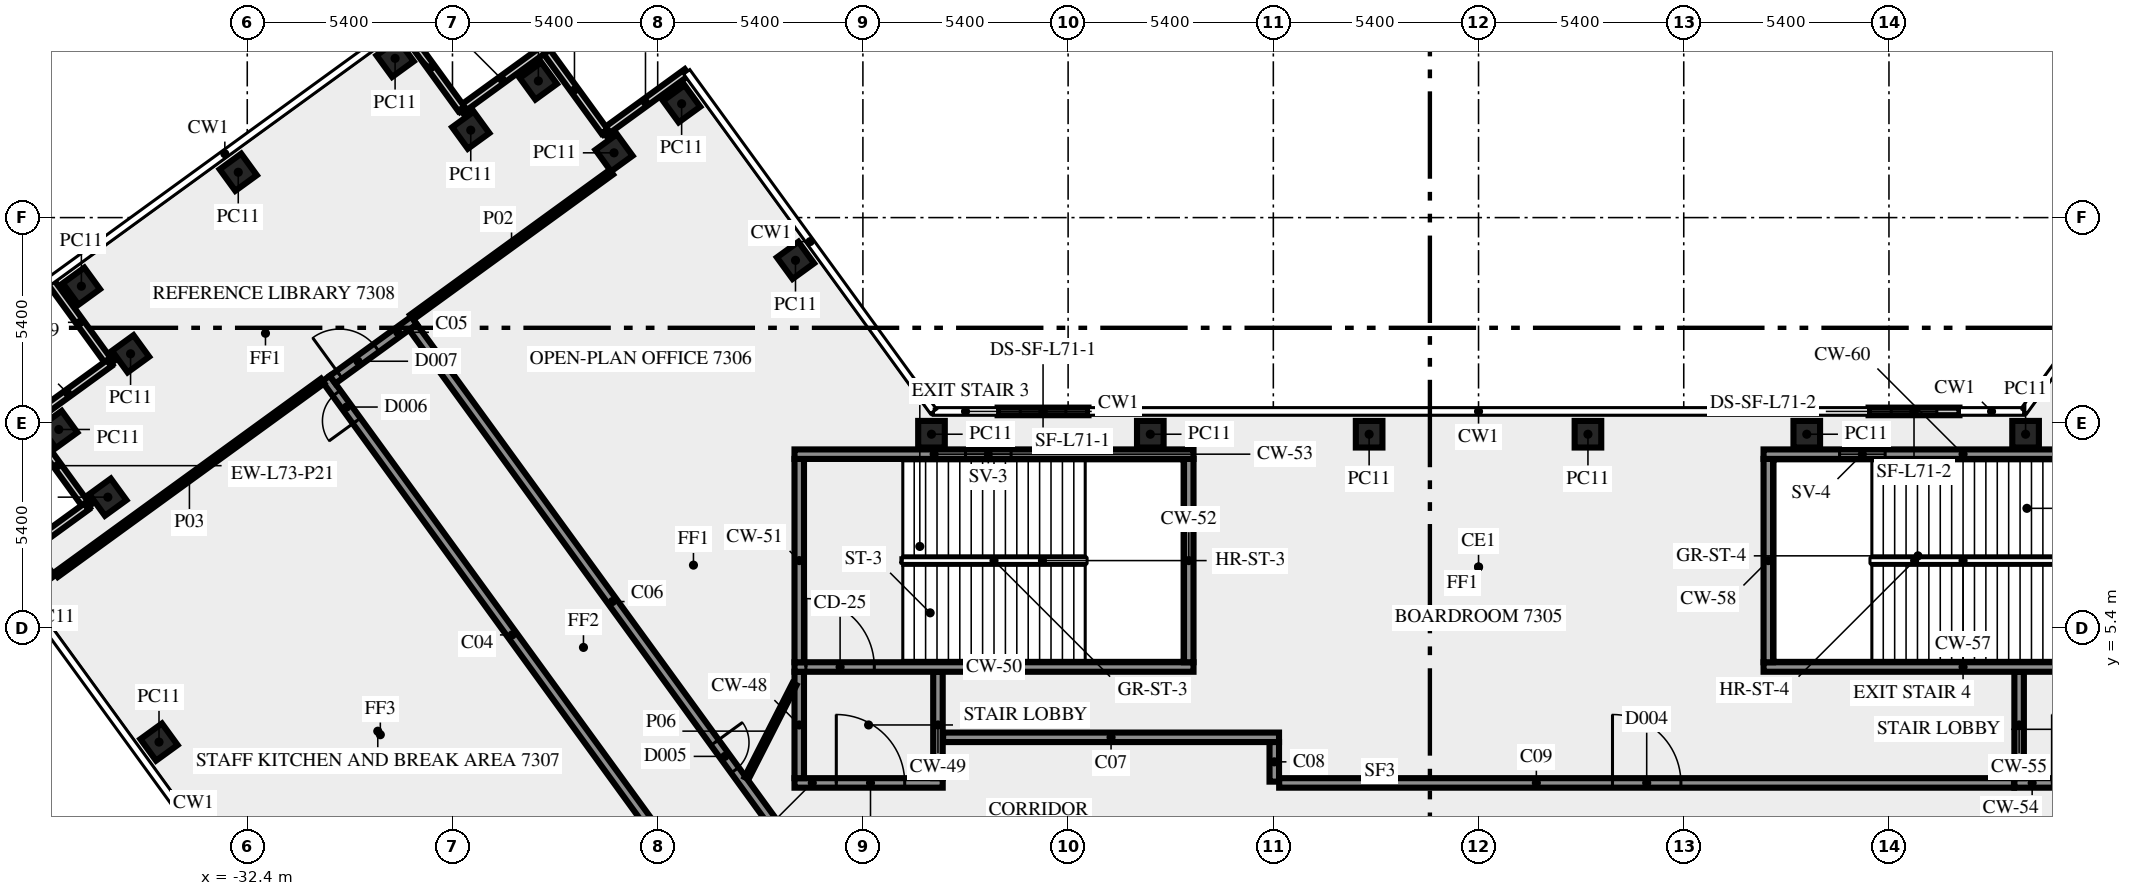
"""IFC4 building model, lengths in metres.
Left out: names, types, materials, properties, quantities, classifications, styles, units other than length and angle.
Written with IfcOpenShell. Run it as: python <this file> out.ifc"""

import sys

from ifc_helpers import new_model, si_unit, direction, frame, frame_2d, origin, origin_2d, place, context, subcontext, project, spatial, rectangle, extrude, element, fill, save


model = new_model("IFC4")
c1 = context("Model", 3, precision=1e-05, world=origin(), true_north=direction((0.0, 1.0)))
c2 = subcontext(c1, "Body", "Model", "MODEL_VIEW")
j1 = project(units=[si_unit("LENGTHUNIT", "METRE"), si_unit("PLANEANGLEUNIT", "RADIAN")], contexts=[c1])
p1 = place(None, origin())
s1 = spatial("IfcSite", under=j1, at=p1, CompositionType="ELEMENT")
p2 = place(p1, origin())
s2 = spatial("IfcBuilding", under=s1, at=p2, CompositionType="ELEMENT")
p3 = place(p2, frame((0.0, 0.0, 315.0)))
s3 = spatial("IfcBuildingStorey", under=s2, at=p3, CompositionType="ELEMENT", Elevation=315.0)
for number, where, z_axis, x_axis in (
    (1, (-17.974, 15.075, 0.0), (0.0, 0.0, 1.0), (-0.588, 0.809, 0.0)),
    (2, (-20.97, 19.195, 0.0), (0.0, 0.0, 1.0), (-0.588, 0.809, 0.0)),
    (3, (-22.749, 17.904, 0.0), (0.0, 0.0, 1.0), (-0.588, 0.809, 0.0)),
    (4, (-24.74, 19.795, 0.0), (0.0, 0.0, 1.0), (-0.588, 0.809, 0.0)),
    (5, (-26.519, 18.5, 0.0), (0.0, 0.0, 1.0), (-0.588, 0.809, 0.0)),
    (6, (-28.51, 20.39, 0.0), (0.0, 0.0, 1.0), (-0.809, -0.588, 0.0)),
    (7, (-32.637, 17.393, 0.0), (0.0, 0.0, 1.0), (-0.809, -0.588, 0.0)),
    (8, (-36.765, 14.395, 0.0), (0.0, 0.0, 1.0), (0.588, -0.809, 0.0)),
    (9, (-35.471, 12.616, 0.0), (0.0, 0.0, 1.0), (-0.809, -0.588, 0.0)),
    (10, (-37.36, 10.625, 0.0), (0.0, 0.0, 1.0), (0.588, -0.809, 0.0)),
    (11, (-36.068, 8.844, 0.0), (0.0, 0.0, 1.0), (0.588, -0.809, 0.0)),
    (12, (-37.96, 6.855, 0.0), (0.0, 0.0, 1.0), (0.588, -0.809, 0.0)),
    (13, (-34.722, 2.4, 0.0), (0.0, 0.0, 1.0), (0.588, -0.809, 0.0)),
    (14, (14.395, 10.5, 0.0), (0.0, 0.0, 1.0), (-1.0, 0.0, 0.0)),
    (15, (8.637, 10.5, 0.0), (0.0, 0.0, 1.0), (-1.0, 0.0, 0.0)),
    (16, (2.879, 10.5, 0.0), (0.0, 0.0, 1.0), (-1.0, 0.0, 0.0)),
    (17, (-2.879, 10.5, 0.0), (0.0, 0.0, 1.0), (-1.0, 0.0, 0.0)),
    (18, (-8.637, 10.5, 0.0), (0.0, 0.0, 1.0), (-1.0, 0.0, 0.0)),
    (19, (-14.395, 10.5, 0.0), (0.0, 0.0, 1.0), (-1.0, 0.0, 0.0)),
):
    element("IfcColumn", number, at=place(p3, frame(where, z_axis=z_axis, x_axis=x_axis)), inside=s3, PredefinedType="COLUMN", context=c2, shape_type="SweptSolid", body=[
        extrude(rectangle(XDim=0.7, YDim=0.7, at=origin_2d()), origin(), (0.0, 0.0, 1.0), 3.65),
    ])
p4 = place(p3, frame((12.655, 11.1, 0.0), z_axis=(0.0, 0.0, 1.0), x_axis=(-1.0, 0.0, 0.0)))
e20 = element("IfcWall", 20, at=p4, inside=s3, PredefinedType="SOLIDWALL", context=c2, shape_type="SweptSolid", body=[
    extrude(rectangle(XDim=2.392, YDim=0.2, at=frame_2d((1.196, 0.0))), origin(), (0.0, 0.0, 1.0), 3.65),
])
p5 = place(p4, frame((0.596, 0.0, 1.0)))
e21 = element("IfcOpeningElement", 21, at=p5, cuts=e20, PredefinedType="OPENING", context=c2, shape_type="SweptSolid", body=[
    extrude(rectangle(XDim=1.2, YDim=1.2, at=frame_2d((0.6, 0.6))), frame((0.0, 0.11, 0.0), z_axis=(0.0, -1.0, 0.0), x_axis=(1.0, 0.0, 0.0)), (0.0, 0.0, 1.0), 0.22),
])
p6 = place(p3, frame((-10.263, 11.1, 0.0), z_axis=(0.0, 0.0, 1.0), x_axis=(-1.0, 0.0, 0.0)))
e22 = element("IfcWall", 22, at=p6, inside=s3, PredefinedType="SOLIDWALL", context=c2, shape_type="SweptSolid", body=[
    extrude(rectangle(XDim=2.392, YDim=0.2, at=frame_2d((1.196, 0.0))), origin(), (0.0, 0.0, 1.0), 3.65),
])
p7 = place(p6, frame((0.596, 0.0, 1.0)))
e23 = element("IfcOpeningElement", 23, at=p7, cuts=e22, PredefinedType="OPENING", context=c2, shape_type="SweptSolid", body=[
    extrude(rectangle(XDim=1.2, YDim=1.2, at=frame_2d((0.6, 0.6))), frame((0.0, 0.11, 0.0), z_axis=(0.0, -1.0, 0.0), x_axis=(1.0, 0.0, 0.0)), (0.0, 0.0, 1.0), 0.22),
])
for number, where, z_axis, x_axis in (
    (24, (-20.829, 20.025, 0.0), (0.0, 0.0, 1.0), (-0.809, -0.588, 0.0)),
    (25, (-22.996, 18.466, 0.0), (0.0, 0.0, 1.0), (-0.588, 0.809, 0.0)),
):
    element("IfcWall", number, at=place(p3, frame(where, z_axis=z_axis, x_axis=x_axis)), inside=s3, PredefinedType="SOLIDWALL", context=c2, shape_type="SweptSolid", body=[
        extrude(rectangle(XDim=2.7, YDim=0.2, at=frame_2d((1.35, 0.0))), origin(), (0.0, 0.0, 1.0), 3.65),
    ])
for number, where, z_axis, x_axis in (
    (26, (-24.6, 20.623, 0.0), (0.0, 0.0, 1.0), (-0.809, -0.588, 0.0)),
    (27, (-26.768, 19.063, 0.0), (0.0, 0.0, 1.0), (-0.588, 0.809, 0.0)),
):
    element("IfcWall", number, at=place(p3, frame(where, z_axis=z_axis, x_axis=x_axis)), inside=s3, PredefinedType="SOLIDWALL", context=c2, shape_type="SweptSolid", body=[
        extrude(rectangle(XDim=2.7, YDim=0.2, at=frame_2d((1.35, 0.0))), origin(), (0.0, 0.0, 1.0), 3.65),
    ])
for number, where, z_axis, x_axis in (
    (28, (-37.592, 14.536, 0.0), (0.0, 0.0, 1.0), (0.588, -0.809, 0.0)),
    (29, (-36.032, 12.369, 0.0), (0.0, 0.0, 1.0), (-0.809, -0.588, 0.0)),
    (30, (-38.189, 10.765, 0.0), (0.0, 0.0, 1.0), (0.588, -0.809, 0.0)),
    (31, (-36.629, 8.597, 0.0), (0.0, 0.0, 1.0), (-0.809, -0.588, 0.0)),
):
    element("IfcWall", number, at=place(p3, frame(where, z_axis=z_axis, x_axis=x_axis)), inside=s3, PredefinedType="SOLIDWALL", context=c2, shape_type="SweptSolid", body=[
        extrude(rectangle(XDim=2.7, YDim=0.2, at=frame_2d((1.35, 0.0))), origin(), (0.0, 0.0, 1.0), 3.65),
    ])
p8 = place(p3, frame((-18.0, 1.325, 0.0), z_axis=(0.0, 0.0, 1.0), x_axis=(1.0, 0.0, 0.0)))
e32 = element("IfcWall", 32, at=p8, inside=s3, PredefinedType="SHEAR", context=c2, shape_type="SweptSolid", body=[
    extrude(rectangle(XDim=3.9, YDim=0.25, at=frame_2d((1.95, 0.0))), origin(), (0.0, 0.0, 1.0), 3.65),
])
p9 = place(p8, frame((1.1, 0.0, 0.0)))
e33 = element("IfcOpeningElement", 33, at=p9, cuts=e32, PredefinedType="OPENING", context=c2, shape_type="SweptSolid", body=[
    extrude(rectangle(XDim=1.8, YDim=2.1, at=frame_2d((0.9, 1.05))), frame((0.0, 0.135, 0.0), z_axis=(0.0, -1.0, 0.0), x_axis=(1.0, 0.0, 0.0)), (0.0, 0.0, 1.0), 0.27),
])
for number, where, z_axis, x_axis in (
    (34, (-17.875, 1.45, 0.0), (0.0, 0.0, 1.0), (0.0, 1.0, 0.0)),
    (35, (-14.225, 1.45, 0.0), (0.0, 0.0, 1.0), (0.0, 1.0, 0.0)),
):
    element("IfcWall", number, at=place(p3, frame(where, z_axis=z_axis, x_axis=x_axis)), inside=s3, PredefinedType="SHEAR", context=c2, shape_type="SweptSolid", body=[
        extrude(rectangle(XDim=2.8, YDim=0.25, at=frame_2d((1.4, 0.0))), origin(), (0.0, 0.0, 1.0), 3.65),
    ])
p10 = place(p3, frame((-18.0, 4.375, 0.0), z_axis=(0.0, 0.0, 1.0), x_axis=(1.0, 0.0, 0.0)))
e36 = element("IfcWall", 36, at=p10, inside=s3, PredefinedType="SHEAR", context=c2, shape_type="SweptSolid", body=[
    extrude(rectangle(XDim=10.5, YDim=0.25, at=frame_2d((5.25, 0.0))), origin(), (0.0, 0.0, 1.0), 3.65),
])
p11 = place(p10, frame((0.3, 0.0, 0.0)))
e37 = element("IfcOpeningElement", 37, at=p11, cuts=e36, PredefinedType="OPENING", context=c2, shape_type="SweptSolid", body=[
    extrude(rectangle(XDim=1.8, YDim=2.1, at=frame_2d((0.9, 1.05))), frame((0.0, 0.135, 0.0), z_axis=(0.0, -1.0, 0.0), x_axis=(1.0, 0.0, 0.0)), (0.0, 0.0, 1.0), 0.27),
])
for number, where, z_axis, x_axis in (
    (38, (-17.875, 4.5, 0.0), (0.0, 0.0, 1.0), (0.0, 1.0, 0.0)),
    (39, (-7.625, 4.5, 0.0), (0.0, 0.0, 1.0), (0.0, 1.0, 0.0)),
):
    element("IfcWall", number, at=place(p3, frame(where, z_axis=z_axis, x_axis=x_axis)), inside=s3, PredefinedType="SHEAR", context=c2, shape_type="SweptSolid", body=[
        extrude(rectangle(XDim=5.35, YDim=0.25, at=frame_2d((2.675, 0.0))), origin(), (0.0, 0.0, 1.0), 3.65),
    ])
p12 = place(p3, frame((-18.0, 9.975, 0.0), z_axis=(0.0, 0.0, 1.0), x_axis=(1.0, 0.0, 0.0)))
e40 = element("IfcWall", 40, at=p12, inside=s3, PredefinedType="SHEAR", context=c2, shape_type="SweptSolid", body=[
    extrude(rectangle(XDim=10.5, YDim=0.25, at=frame_2d((5.25, 0.0))), origin(), (0.0, 0.0, 1.0), 3.65),
])
p13 = place(p12, frame((4.5, 0.0, 1.0)))
e41 = element("IfcOpeningElement", 41, at=p13, cuts=e40, PredefinedType="OPENING", context=c2, shape_type="SweptSolid", body=[
    extrude(rectangle(XDim=1.2, YDim=1.2, at=frame_2d((0.6, 0.6))), frame((0.0, 0.135, 0.0), z_axis=(0.0, -1.0, 0.0), x_axis=(1.0, 0.0, 0.0)), (0.0, 0.0, 1.0), 0.27),
])
p14 = place(p3, frame((14.1, 1.325, 0.0), z_axis=(0.0, 0.0, 1.0), x_axis=(1.0, 0.0, 0.0)))
e42 = element("IfcWall", 42, at=p14, inside=s3, PredefinedType="SHEAR", context=c2, shape_type="SweptSolid", body=[
    extrude(rectangle(XDim=3.9, YDim=0.25, at=frame_2d((1.95, 0.0))), origin(), (0.0, 0.0, 1.0), 3.65),
])
p15 = place(p14, frame((1.0, 0.0, 0.0)))
e43 = element("IfcOpeningElement", 43, at=p15, cuts=e42, PredefinedType="OPENING", context=c2, shape_type="SweptSolid", body=[
    extrude(rectangle(XDim=1.8, YDim=2.1, at=frame_2d((0.9, 1.05))), frame((0.0, 0.135, 0.0), z_axis=(0.0, -1.0, 0.0), x_axis=(1.0, 0.0, 0.0)), (0.0, 0.0, 1.0), 0.27),
])
p16 = place(p3, frame((14.225, 1.45, 0.0), z_axis=(0.0, 0.0, 1.0), x_axis=(0.0, 1.0, 0.0)))
e44 = element("IfcWall", 44, at=p16, inside=s3, PredefinedType="SHEAR", context=c2, shape_type="SweptSolid", body=[
    extrude(rectangle(XDim=2.8, YDim=0.25, at=frame_2d((1.4, 0.0))), origin(), (0.0, 0.0, 1.0), 3.65),
])
p17 = place(p3, frame((7.5, 4.375, 0.0), z_axis=(0.0, 0.0, 1.0), x_axis=(1.0, 0.0, 0.0)))
e45 = element("IfcWall", 45, at=p17, inside=s3, PredefinedType="SHEAR", context=c2, shape_type="SweptSolid", body=[
    extrude(rectangle(XDim=10.5, YDim=0.25, at=frame_2d((5.25, 0.0))), origin(), (0.0, 0.0, 1.0), 3.65),
])
p18 = place(p17, frame((8.4, 0.0, 0.0)))
e46 = element("IfcOpeningElement", 46, at=p18, cuts=e45, PredefinedType="OPENING", context=c2, shape_type="SweptSolid", body=[
    extrude(rectangle(XDim=1.8, YDim=2.1, at=frame_2d((0.9, 1.05))), frame((0.0, 0.135, 0.0), z_axis=(0.0, -1.0, 0.0), x_axis=(1.0, 0.0, 0.0)), (0.0, 0.0, 1.0), 0.27),
])
p19 = place(p3, frame((7.625, 4.5, 0.0), z_axis=(0.0, 0.0, 1.0), x_axis=(0.0, 1.0, 0.0)))
e47 = element("IfcWall", 47, at=p19, inside=s3, PredefinedType="SHEAR", context=c2, shape_type="SweptSolid", body=[
    extrude(rectangle(XDim=5.35, YDim=0.25, at=frame_2d((2.675, 0.0))), origin(), (0.0, 0.0, 1.0), 3.65),
])
p20 = place(p3, frame((7.5, 9.975, 0.0), z_axis=(0.0, 0.0, 1.0), x_axis=(1.0, 0.0, 0.0)))
e48 = element("IfcWall", 48, at=p20, inside=s3, PredefinedType="SHEAR", context=c2, shape_type="SweptSolid", body=[
    extrude(rectangle(XDim=10.5, YDim=0.25, at=frame_2d((5.25, 0.0))), origin(), (0.0, 0.0, 1.0), 3.65),
])
p21 = place(p20, frame((2.0, 0.0, 1.0)))
e49 = element("IfcOpeningElement", 49, at=p21, cuts=e48, PredefinedType="OPENING", context=c2, shape_type="SweptSolid", body=[
    extrude(rectangle(XDim=1.2, YDim=1.2, at=frame_2d((0.6, 0.6))), frame((0.0, 0.135, 0.0), z_axis=(0.0, -1.0, 0.0), x_axis=(1.0, 0.0, 0.0)), (0.0, 0.0, 1.0), 0.27),
])
p22 = place(p3, frame((-20.531, -1.523, 0.0), z_axis=(0.0, 0.0, 1.0), x_axis=(-0.587785867777, 0.809016547199, 0.0)))
e50 = element("IfcWall", 50, at=p22, inside=s3, PredefinedType="SOLIDWALL", context=c2, shape_type="SweptSolid", body=[
    extrude(rectangle(XDim=16.67, YDim=0.25, at=frame_2d((8.335, 0.0))), origin(), (0.0, 0.0, 1.0), 3.65),
])
p23 = place(p22, frame((15.296, 0.0, 0.0)))
e51 = element("IfcOpeningElement", 51, at=p23, cuts=e50, PredefinedType="OPENING", context=c2, shape_type="SweptSolid", body=[
    extrude(rectangle(XDim=0.9, YDim=2.1, at=frame_2d((0.45, 1.05))), frame((0.0, 0.135, 0.0), z_axis=(0.0, -1.0, 0.0), x_axis=(1.0, 0.0, 0.0)), (0.0, 0.0, 1.0), 0.27),
])
p24 = place(p3, frame((-30.155, 11.936, 0.0), z_axis=(0.0, 0.0, 1.0), x_axis=(0.809038743598, 0.587755315891, 0.0)))
e52 = element("IfcWall", 52, at=p24, inside=s3, PredefinedType="SOLIDWALL", context=c2, shape_type="SweptSolid", body=[
    extrude(rectangle(XDim=2.65, YDim=0.25, at=frame_2d((1.325, 0.0))), origin(), (0.0, 0.0, 1.0), 3.65),
])
p25 = place(p24, frame((0.225, 0.0, 0.0)))
e53 = element("IfcOpeningElement", 53, at=p25, cuts=e52, PredefinedType="OPENING", context=c2, shape_type="SweptSolid", body=[
    extrude(rectangle(XDim=1.2, YDim=2.1, at=frame_2d((0.6, 1.05))), frame((0.0, 0.135, 0.0), z_axis=(0.0, -1.0, 0.0), x_axis=(1.0, 0.0, 0.0)), (0.0, 0.0, 1.0), 0.27),
])
p26 = place(p3, frame((-28.039, 13.319, 0.0), z_axis=(0.0, 0.0, 1.0), x_axis=(0.587791911753, -0.809012155952, 0.0)))
e54 = element("IfcWall", 54, at=p26, inside=s3, PredefinedType="SOLIDWALL", context=c2, shape_type="SweptSolid", body=[
    extrude(rectangle(XDim=17.853, YDim=0.25, at=frame_2d((8.927, 0.0))), origin(), (0.0, 0.0, 1.0), 3.65),
])
p27 = place(p26, frame((13.512, 0.0, 0.0)))
e55 = element("IfcOpeningElement", 55, at=p27, cuts=e54, PredefinedType="OPENING", context=c2, shape_type="SweptSolid", body=[
    extrude(rectangle(XDim=0.9, YDim=2.1, at=frame_2d((0.45, 1.05))), frame((0.0, 0.135, 0.0), z_axis=(0.0, -1.0, 0.0), x_axis=(1.0, 0.0, 0.0)), (0.0, 0.0, 1.0), 0.27),
])
p28 = place(p3, frame((-14.09, 2.525, 0.0), z_axis=(0.0, 0.0, 1.0), x_axis=(1.0, 0.0, 0.0)))
e56 = element("IfcWall", 56, at=p28, inside=s3, PredefinedType="SOLIDWALL", context=c2, shape_type="SweptSolid", body=[
    extrude(rectangle(XDim=8.84, YDim=0.25, at=frame_2d((4.42, 0.0))), origin(), (0.0, 0.0, 1.0), 3.65),
])
p29 = place(p3, frame((-5.375, 2.4, 0.0), z_axis=(0.0, 0.0, 1.0), x_axis=(0.0, -1.0, 0.0)))
e57 = element("IfcWall", 57, at=p29, inside=s3, PredefinedType="SOLIDWALL", context=c2, shape_type="SweptSolid", body=[
    extrude(rectangle(XDim=1.041, YDim=0.25, at=frame_2d((0.521, 0.0))), origin(), (0.0, 0.0, 1.0), 3.65),
])
p30 = place(p3, frame((-5.246, 1.325, 0.0), z_axis=(0.0, 0.0, 1.0), x_axis=(1.0, 0.0, 0.0)))
e58 = element("IfcWall", 58, at=p30, inside=s3, PredefinedType="SOLIDWALL", context=c2, shape_type="SweptSolid", body=[
    extrude(rectangle(XDim=19.336, YDim=0.25, at=frame_2d((9.668, 0.0))), origin(), (0.0, 0.0, 1.0), 3.65),
])
p31 = place(p30, frame((8.771, 0.0, 0.0)))
e59 = element("IfcOpeningElement", 59, at=p31, cuts=e58, PredefinedType="OPENING", context=c2, shape_type="SweptSolid", body=[
    extrude(rectangle(XDim=1.8, YDim=2.1, at=frame_2d((0.9, 1.05))), frame((0.0, 0.135, 0.0), z_axis=(0.0, -1.0, 0.0), x_axis=(1.0, 0.0, 0.0)), (0.0, 0.0, 1.0), 0.27),
])
p32 = place(p3, frame((-22.818, 17.396, 0.0), z_axis=(0.0, 0.0, 1.0), x_axis=(-0.809000932727, -0.587807358619, 0.0)))
e60 = element("IfcWall", 60, at=p32, inside=s3, PredefinedType="PARTITIONING", context=c2, shape_type="SweptSolid", body=[
    extrude(rectangle(XDim=6.496, YDim=0.15, at=frame_2d((3.248, 0.0))), origin(), (0.0, 0.0, 1.0), 3.65),
])
p33 = place(p3, frame((-37.429, 6.805, 0.0), z_axis=(0.0, 0.0, 1.0), x_axis=(0.809020922653, 0.587779845444, 0.0)))
e61 = element("IfcWall", 61, at=p33, inside=s3, PredefinedType="PARTITIONING", context=c2, shape_type="SweptSolid", body=[
    extrude(rectangle(XDim=8.67, YDim=0.15, at=frame_2d((4.335, 0.0))), origin(), (0.0, 0.0, 1.0), 3.65),
])
p34 = place(p3, frame((-19.261, 1.45, 0.0), z_axis=(0.0, 0.0, 1.0), x_axis=(0.453950796792, 0.891026752736, 0.0)))
e62 = element("IfcWall", 62, at=p34, inside=s3, PredefinedType="PARTITIONING", context=c2, shape_type="SweptSolid", body=[
    extrude(rectangle(XDim=2.778, YDim=0.12, at=frame_2d((1.389, 0.0))), origin(), (0.0, 0.0, 1.0), 3.65),
])
p35 = place(p5, origin())
e63 = element("IfcWindow", 63, at=p35, inside=s3, PartitioningType="SINGLE_PANEL", PredefinedType="WINDOW", context=c2, shape_type="SweptSolid", body=[
    extrude(rectangle(XDim=1.2, YDim=1.2, at=frame_2d((0.6, 0.6))), frame((0.0, 0.03, 0.0), z_axis=(0.0, -1.0, 0.0), x_axis=(1.0, 0.0, 0.0)), (0.0, 0.0, 1.0), 0.06),
])
fill(e21, e63)
p36 = place(p7, origin())
e64 = element("IfcWindow", 64, at=p36, inside=s3, PartitioningType="SINGLE_PANEL", PredefinedType="WINDOW", context=c2, shape_type="SweptSolid", body=[
    extrude(rectangle(XDim=1.2, YDim=1.2, at=frame_2d((0.6, 0.6))), frame((0.0, 0.03, 0.0), z_axis=(0.0, -1.0, 0.0), x_axis=(1.0, 0.0, 0.0)), (0.0, 0.0, 1.0), 0.06),
])
fill(e23, e64)
p37 = place(p9, origin())
e65 = element("IfcDoor", 65, at=p37, inside=s3, OperationType="DOUBLE_DOOR_SINGLE_SWING", PredefinedType="DOOR", context=c2, shape_type="SweptSolid", body=[
    extrude(rectangle(XDim=1.8, YDim=2.1, at=frame_2d((0.9, 1.05))), frame((0.0, 0.025, 0.0), z_axis=(0.0, -1.0, 0.0), x_axis=(1.0, 0.0, 0.0)), (0.0, 0.0, 1.0), 0.05),
])
fill(e33, e65)
p38 = place(p11, origin())
e66 = element("IfcDoor", 66, at=p38, inside=s3, OperationType="DOUBLE_DOOR_SINGLE_SWING", PredefinedType="DOOR", context=c2, shape_type="SweptSolid", body=[
    extrude(rectangle(XDim=1.8, YDim=2.1, at=frame_2d((0.9, 1.05))), frame((0.0, 0.025, 0.0), z_axis=(0.0, -1.0, 0.0), x_axis=(1.0, 0.0, 0.0)), (0.0, 0.0, 1.0), 0.05),
])
fill(e37, e66)
p39 = place(p13, origin())
e67 = element("IfcWindow", 67, at=p39, inside=s3, PartitioningType="SINGLE_PANEL", PredefinedType="WINDOW", context=c2, shape_type="SweptSolid", body=[
    extrude(rectangle(XDim=1.2, YDim=1.2, at=frame_2d((0.6, 0.6))), frame((0.0, 0.03, 0.0), z_axis=(0.0, -1.0, 0.0), x_axis=(1.0, 0.0, 0.0)), (0.0, 0.0, 1.0), 0.06),
])
fill(e41, e67)
p40 = place(p15, origin())
e68 = element("IfcDoor", 68, at=p40, inside=s3, OperationType="DOUBLE_DOOR_SINGLE_SWING", PredefinedType="DOOR", context=c2, shape_type="SweptSolid", body=[
    extrude(rectangle(XDim=1.8, YDim=2.1, at=frame_2d((0.9, 1.05))), frame((0.0, 0.025, 0.0), z_axis=(0.0, -1.0, 0.0), x_axis=(1.0, 0.0, 0.0)), (0.0, 0.0, 1.0), 0.05),
])
fill(e43, e68)
p41 = place(p21, origin())
e69 = element("IfcWindow", 69, at=p41, inside=s3, PartitioningType="SINGLE_PANEL", PredefinedType="WINDOW", context=c2, shape_type="SweptSolid", body=[
    extrude(rectangle(XDim=1.2, YDim=1.2, at=frame_2d((0.6, 0.6))), frame((0.0, 0.03, 0.0), z_axis=(0.0, -1.0, 0.0), x_axis=(1.0, 0.0, 0.0)), (0.0, 0.0, 1.0), 0.06),
])
fill(e49, e69)
p42 = place(p31, origin())
e70 = element("IfcDoor", 70, at=p42, inside=s3, OperationType="DOUBLE_DOOR_SINGLE_SWING", PredefinedType="DOOR", context=c2, shape_type="SweptSolid", body=[
    extrude(rectangle(XDim=1.8, YDim=2.1, at=frame_2d((0.9, 1.05))), frame((0.0, 0.025, 0.0), z_axis=(0.0, -1.0, 0.0), x_axis=(1.0, 0.0, 0.0)), (0.0, 0.0, 1.0), 0.05),
])
fill(e59, e70)
p43 = place(p27, origin())
e71 = element("IfcDoor", 71, at=p43, inside=s3, OperationType="SINGLE_SWING_RIGHT", PredefinedType="DOOR", context=c2, shape_type="SweptSolid", body=[
    extrude(rectangle(XDim=0.9, YDim=2.1, at=frame_2d((0.45, 1.05))), frame((0.0, 0.025, 0.0), z_axis=(0.0, -1.0, 0.0), x_axis=(1.0, 0.0, 0.0)), (0.0, 0.0, 1.0), 0.05),
])
fill(e55, e71)
p44 = place(p25, origin())
e72 = element("IfcDoor", 72, at=p44, inside=s3, OperationType="SINGLE_SWING_LEFT", PredefinedType="DOOR", context=c2, shape_type="SweptSolid", body=[
    extrude(rectangle(XDim=1.2, YDim=2.1, at=frame_2d((0.6, 1.05))), frame((0.0, 0.025, 0.0), z_axis=(0.0, -1.0, 0.0), x_axis=(1.0, 0.0, 0.0)), (0.0, 0.0, 1.0), 0.05),
])
fill(e53, e72)
p45 = place(p23, origin())
e73 = element("IfcDoor", 73, at=p45, inside=s3, OperationType="SINGLE_SWING_RIGHT", PredefinedType="DOOR", context=c2, shape_type="SweptSolid", body=[
    extrude(rectangle(XDim=0.9, YDim=2.1, at=frame_2d((0.45, 1.05))), frame((0.0, 0.025, 0.0), z_axis=(0.0, -1.0, 0.0), x_axis=(1.0, 0.0, 0.0)), (0.0, 0.0, 1.0), 0.05),
])
fill(e51, e73)
save(model, sys.argv[1])
